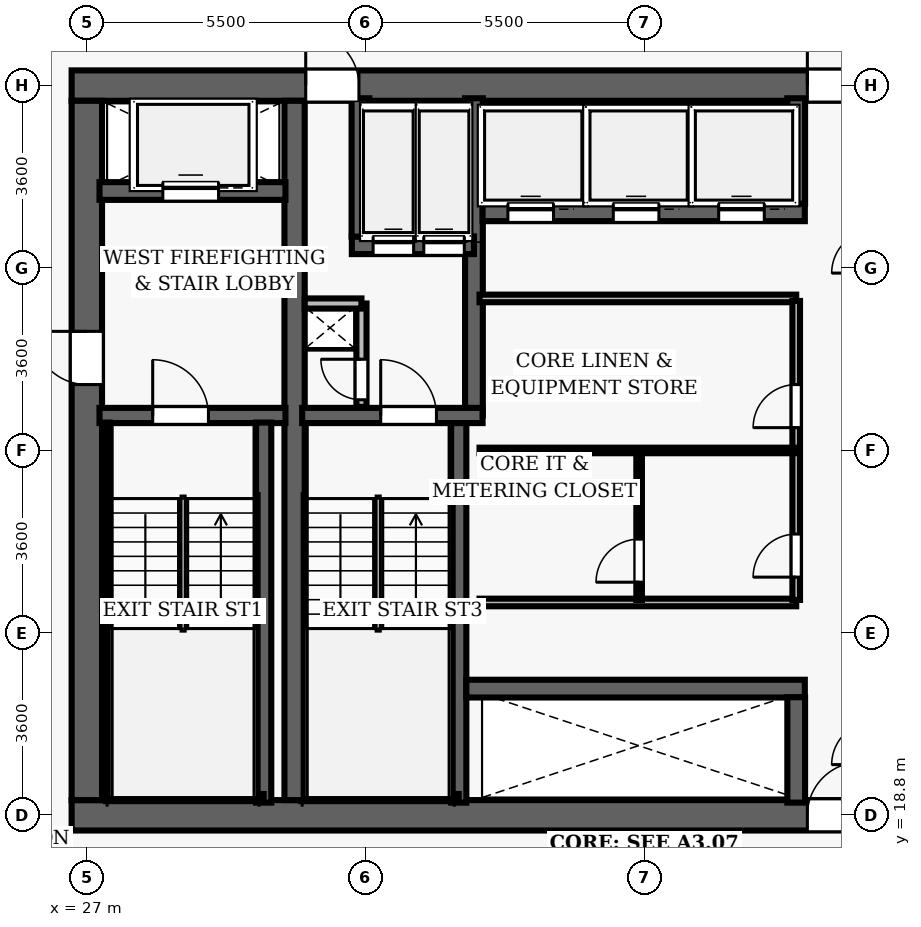
"""IFC4 building model, lengths in metres.
Left out: names, types, materials, properties, quantities, classifications, styles, units other than length and angle.
Written with IfcOpenShell. Run it as: python <this file> out.ifc"""

import sys

from ifc_helpers import new_model, si_unit, direction, frame, frame_2d, origin, place, context, subcontext, project, spatial, rectangle, extrude, element, fill, save


model = new_model("IFC4")
c1 = context("Model", 3, precision=1e-05, world=origin(), true_north=direction((0.0, 1.0)))
c2 = subcontext(c1, "Body", "Model", "MODEL_VIEW")
j1 = project(units=[si_unit("LENGTHUNIT", "METRE"), si_unit("PLANEANGLEUNIT", "RADIAN")], contexts=[c1])
p1 = place(None, origin())
s1 = spatial("IfcSite", under=j1, at=p1, CompositionType="ELEMENT")
p2 = place(p1, origin())
s2 = spatial("IfcBuilding", under=s1, at=p2, CompositionType="ELEMENT")
p3 = place(p2, frame((0.0, 0.0, 41.4)))
s3 = spatial("IfcBuildingStorey", under=s2, at=p3, CompositionType="ELEMENT", Elevation=41.4)
p4 = place(p3, frame((26.7, 18.8, 0.0), z_axis=(0.0, 0.0, 1.0), x_axis=(1.0, 0.0, 0.0)))
e1 = element("IfcWall", 1, at=p4, inside=s3, PredefinedType="SHEAR", context=c2, shape_type="SweptSolid", body=[
    extrude(rectangle(XDim=22.6, YDim=0.6, at=frame_2d((11.3, 0.0))), origin(), (0.0, 0.0, 1.0), 3.5),
])
p5 = place(p4, frame((14.52, 0.0, 0.0)))
e2 = element("IfcOpeningElement", 2, at=p5, cuts=e1, PredefinedType="OPENING", context=c2, shape_type="SweptSolid", body=[
    extrude(rectangle(XDim=1.05, YDim=2.15, at=frame_2d((0.525, 1.075))), frame((0.0, 0.31, 0.0), z_axis=(0.0, -1.0, 0.0), x_axis=(1.0, 0.0, 0.0)), (0.0, 0.0, 1.0), 0.62),
])
p6 = place(p3, frame((26.7, 33.2, 0.0), z_axis=(0.0, 0.0, 1.0), x_axis=(1.0, 0.0, 0.0)))
e3 = element("IfcWall", 3, at=p6, inside=s3, PredefinedType="SHEAR", context=c2, shape_type="SweptSolid", body=[
    extrude(rectangle(XDim=22.6, YDim=0.6, at=frame_2d((11.3, 0.0))), origin(), (0.0, 0.0, 1.0), 3.5),
])
p7 = place(p6, frame((4.62, 0.0, 0.0)))
e4 = element("IfcOpeningElement", 4, at=p7, cuts=e3, PredefinedType="OPENING", context=c2, shape_type="SweptSolid", body=[
    extrude(rectangle(XDim=1.05, YDim=2.15, at=frame_2d((0.525, 1.075))), frame((0.0, 0.31, 0.0), z_axis=(0.0, -1.0, 0.0), x_axis=(1.0, 0.0, 0.0)), (0.0, 0.0, 1.0), 0.62),
])
p8 = place(p6, frame((14.52, 0.0, 0.0)))
e5 = element("IfcOpeningElement", 5, at=p8, cuts=e3, PredefinedType="OPENING", context=c2, shape_type="SweptSolid", body=[
    extrude(rectangle(XDim=1.05, YDim=2.15, at=frame_2d((0.525, 1.075))), frame((0.0, 0.31, 0.0), z_axis=(0.0, -1.0, 0.0), x_axis=(1.0, 0.0, 0.0)), (0.0, 0.0, 1.0), 0.62),
])
p9 = place(p3, frame((27.0, 19.1, 0.0), z_axis=(0.0, 0.0, 1.0), x_axis=(0.0, 1.0, 0.0)))
e6 = element("IfcWall", 6, at=p9, inside=s3, PredefinedType="SHEAR", context=c2, shape_type="SweptSolid", body=[
    extrude(rectangle(XDim=13.8, YDim=0.6, at=frame_2d((6.9, 0.0))), origin(), (0.0, 0.0, 1.0), 3.5),
])
p10 = place(p9, frame((8.2, 0.0, 0.0)))
e7 = element("IfcOpeningElement", 7, at=p10, cuts=e6, PredefinedType="OPENING", context=c2, shape_type="SweptSolid", body=[
    extrude(rectangle(XDim=1.05, YDim=2.15, at=frame_2d((0.525, 1.075))), frame((0.0, 0.31, 0.0), z_axis=(0.0, -1.0, 0.0), x_axis=(1.0, 0.0, 0.0)), (0.0, 0.0, 1.0), 0.62),
])
p11 = place(p3, frame((31.1, 19.1, 0.0), z_axis=(0.0, 0.0, 1.0), x_axis=(0.0, 1.0, 0.0)))
e8 = element("IfcWall", 8, at=p11, inside=s3, PredefinedType="SHEAR", context=c2, shape_type="SweptSolid", body=[
    extrude(rectangle(XDim=13.8, YDim=0.4, at=frame_2d((6.9, 0.0))), origin(), (0.0, 0.0, 1.0), 3.5),
])
p12 = place(p3, frame((27.25, 26.69, 0.0), z_axis=(0.0, 0.0, 1.0), x_axis=(1.0, 0.0, 0.0)))
e9 = element("IfcWall", 9, at=p12, inside=s3, PredefinedType="SHEAR", context=c2, shape_type="SweptSolid", body=[
    extrude(rectangle(XDim=3.67, YDim=0.3, at=frame_2d((1.835, 0.0))), origin(), (0.0, 0.0, 1.0), 3.5),
])
p13 = place(p12, frame((1.05, 0.0, 0.0)))
e10 = element("IfcOpeningElement", 10, at=p13, cuts=e9, PredefinedType="OPENING", context=c2, shape_type="SweptSolid", body=[
    extrude(rectangle(XDim=1.1, YDim=2.15, at=frame_2d((0.55, 1.075))), frame((0.0, 0.16, 0.0), z_axis=(0.0, -1.0, 0.0), x_axis=(1.0, 0.0, 0.0)), (0.0, 0.0, 1.0), 0.32),
])
p14 = place(p3, frame((30.49, 19.05, 0.0), z_axis=(0.0, 0.0, 1.0), x_axis=(0.0, 1.0, 0.0)))
e11 = element("IfcWall", 11, at=p14, inside=s3, PredefinedType="SHEAR", context=c2, shape_type="SweptSolid", body=[
    extrude(rectangle(XDim=7.5, YDim=0.3, at=frame_2d((3.75, 0.0))), origin(), (0.0, 0.0, 1.0), 3.5),
])
p15 = place(p3, frame((27.395, 19.1, 0.0), z_axis=(0.0, 0.0, 1.0), x_axis=(0.0, 1.0, 0.0)))
e12 = element("IfcWall", 12, at=p15, inside=s3, PredefinedType="SHEAR", context=c2, shape_type="SweptSolid", body=[
    extrude(rectangle(XDim=7.45, YDim=0.12, at=frame_2d((3.725, 0.0))), origin(), (0.0, 0.0, 1.0), 3.5),
])
p16 = place(p3, frame((27.395, 19.16, 0.0), z_axis=(0.0, 0.0, 1.0), x_axis=(1.0, 0.0, 0.0)))
e13 = element("IfcWall", 13, at=p16, inside=s3, PredefinedType="SHEAR", context=c2, shape_type="SweptSolid", body=[
    extrude(rectangle(XDim=3.095, YDim=0.12, at=frame_2d((1.547, 0.0))), origin(), (0.0, 0.0, 1.0), 3.5),
])
p17 = place(p3, frame((27.25, 31.12, 0.0), z_axis=(0.0, 0.0, 1.0), x_axis=(1.0, 0.0, 0.0)))
e14 = element("IfcWall", 14, at=p17, inside=s3, PredefinedType="SHEAR", context=c2, shape_type="SweptSolid", body=[
    extrude(rectangle(XDim=3.67, YDim=0.35, at=frame_2d((1.835, 0.0))), origin(), (0.0, 0.0, 1.0), 2.6),
])
p18 = place(p17, frame((1.25, 0.0, 0.0)))
e15 = element("IfcOpeningElement", 15, at=p18, cuts=e14, PredefinedType="OPENING", context=c2, shape_type="SweptSolid", body=[
    extrude(rectangle(XDim=1.1, YDim=2.15, at=frame_2d((0.55, 1.075))), frame((0.0, 0.185, 0.0), z_axis=(0.0, -1.0, 0.0), x_axis=(1.0, 0.0, 0.0)), (0.0, 0.0, 1.0), 0.37),
])
p19 = place(p3, frame((34.34, 19.05, 0.0), z_axis=(0.0, 0.0, 1.0), x_axis=(0.0, 1.0, 0.0)))
e16 = element("IfcWall", 16, at=p19, inside=s3, PredefinedType="SHEAR", context=c2, shape_type="SweptSolid", body=[
    extrude(rectangle(XDim=7.5, YDim=0.3, at=frame_2d((3.75, 0.0))), origin(), (0.0, 0.0, 1.0), 3.5),
])
p20 = place(p3, frame((34.64, 26.69, 0.0), z_axis=(0.0, 0.0, 1.0), x_axis=(0.0, 1.0, 0.0)))
e17 = element("IfcWall", 17, at=p20, inside=s3, PredefinedType="SHEAR", context=c2, shape_type="SweptSolid", body=[
    extrude(rectangle(XDim=6.26, YDim=0.35, at=frame_2d((3.13, 0.0))), origin(), (0.0, 0.0, 1.0), 3.5),
])
p21 = place(p3, frame((31.25, 26.69, 0.0), z_axis=(0.0, 0.0, 1.0), x_axis=(1.0, 0.0, 0.0)))
e18 = element("IfcWall", 18, at=p21, inside=s3, PredefinedType="SHEAR", context=c2, shape_type="SweptSolid", body=[
    extrude(rectangle(XDim=3.56, YDim=0.3, at=frame_2d((1.78, 0.0))), origin(), (0.0, 0.0, 1.0), 3.5),
])
p22 = place(p21, frame((1.55, 0.0, 0.0)))
e19 = element("IfcOpeningElement", 19, at=p22, cuts=e18, PredefinedType="OPENING", context=c2, shape_type="SweptSolid", body=[
    extrude(rectangle(XDim=1.1, YDim=2.15, at=frame_2d((0.55, 1.075))), frame((0.0, 0.16, 0.0), z_axis=(0.0, -1.0, 0.0), x_axis=(1.0, 0.0, 0.0)), (0.0, 0.0, 1.0), 0.32),
])
p23 = place(p3, frame((31.3, 19.16, 0.0), z_axis=(0.0, 0.0, 1.0), x_axis=(1.0, 0.0, 0.0)))
e20 = element("IfcWall", 20, at=p23, inside=s3, PredefinedType="SHEAR", context=c2, shape_type="SweptSolid", body=[
    extrude(rectangle(XDim=3.04, YDim=0.12, at=frame_2d((1.52, 0.0))), origin(), (0.0, 0.0, 1.0), 3.5),
])
p24 = place(p3, frame((32.23, 30.05, 0.0), z_axis=(0.0, 0.0, 1.0), x_axis=(1.0, 0.0, 0.0)))
e21 = element("IfcWall", 21, at=p24, inside=s3, PredefinedType="SHEAR", context=c2, shape_type="SweptSolid", body=[
    extrude(rectangle(XDim=2.41, YDim=0.35, at=frame_2d((1.205, 0.0))), origin(), (0.0, 0.0, 1.0), 2.6),
])
p25 = place(p24, frame((0.42, 0.0, 0.0)))
e22 = element("IfcOpeningElement", 22, at=p25, cuts=e21, PredefinedType="OPENING", context=c2, shape_type="SweptSolid", body=[
    extrude(rectangle(XDim=0.8, YDim=2.15, at=frame_2d((0.4, 1.075))), frame((0.0, 0.185, 0.0), z_axis=(0.0, -1.0, 0.0), x_axis=(1.0, 0.0, 0.0)), (0.0, 0.0, 1.0), 0.37),
])
p26 = place(p24, frame((1.42, 0.0, 0.0)))
e23 = element("IfcOpeningElement", 23, at=p26, cuts=e21, PredefinedType="OPENING", context=c2, shape_type="SweptSolid", body=[
    extrude(rectangle(XDim=0.8, YDim=2.15, at=frame_2d((0.4, 1.075))), frame((0.0, 0.185, 0.0), z_axis=(0.0, -1.0, 0.0), x_axis=(1.0, 0.0, 0.0)), (0.0, 0.0, 1.0), 0.37),
])
p27 = place(p3, frame((32.4, 30.22, 0.0), z_axis=(0.0, 0.0, 1.0), x_axis=(0.0, 1.0, 0.0)))
e24 = element("IfcWall", 24, at=p27, inside=s3, PredefinedType="SHEAR", context=c2, shape_type="SweptSolid", body=[
    extrude(rectangle(XDim=2.73, YDim=0.35, at=frame_2d((1.365, 0.0))), origin(), (0.0, 0.0, 1.0), 2.6),
])
p28 = place(p3, frame((32.42, 26.86, 0.0), z_axis=(0.0, 0.0, 1.0), x_axis=(0.0, 1.0, 0.0)))
e25 = element("IfcWall", 25, at=p28, inside=s3, PredefinedType="PARTITIONING", context=c2, shape_type="SweptSolid", body=[
    extrude(rectangle(XDim=2.04, YDim=0.2, at=frame_2d((1.02, 0.0))), origin(), (0.0, 0.0, 1.0), 2.6),
])
p29 = place(p28, frame((0.14, 0.0, 0.0)))
e26 = element("IfcOpeningElement", 26, at=p29, cuts=e25, PredefinedType="OPENING", context=c2, shape_type="SweptSolid", body=[
    extrude(rectangle(XDim=0.8, YDim=2.05, at=frame_2d((0.4, 1.025))), frame((0.0, 0.11, 0.0), z_axis=(0.0, -1.0, 0.0), x_axis=(1.0, 0.0, 0.0)), (0.0, 0.0, 1.0), 0.22),
])
p30 = place(p3, frame((31.3, 28.9, 0.0), z_axis=(0.0, 0.0, 1.0), x_axis=(1.0, 0.0, 0.0)))
e27 = element("IfcWall", 27, at=p30, inside=s3, PredefinedType="PARTITIONING", context=c2, shape_type="SweptSolid", body=[
    extrude(rectangle(XDim=1.12, YDim=0.2, at=frame_2d((0.56, 0.0))), origin(), (0.0, 0.0, 1.0), 2.6),
])
p31 = place(p3, frame((34.81, 30.7, 0.0), z_axis=(0.0, 0.0, 1.0), x_axis=(1.0, 0.0, 0.0)))
e28 = element("IfcWall", 28, at=p31, inside=s3, PredefinedType="SHEAR", context=c2, shape_type="SweptSolid", body=[
    extrude(rectangle(XDim=6.36, YDim=0.35, at=frame_2d((3.18, 0.0))), origin(), (0.0, 0.0, 1.0), 2.6),
])
p32 = place(p31, frame((0.5, 0.0, 0.0)))
e29 = element("IfcOpeningElement", 29, at=p32, cuts=e28, PredefinedType="OPENING", context=c2, shape_type="SweptSolid", body=[
    extrude(rectangle(XDim=0.9, YDim=2.15, at=frame_2d((0.45, 1.075))), frame((0.0, 0.185, 0.0), z_axis=(0.0, -1.0, 0.0), x_axis=(1.0, 0.0, 0.0)), (0.0, 0.0, 1.0), 0.37),
])
p33 = place(p31, frame((2.58, 0.0, 0.0)))
e30 = element("IfcOpeningElement", 30, at=p33, cuts=e28, PredefinedType="OPENING", context=c2, shape_type="SweptSolid", body=[
    extrude(rectangle(XDim=0.9, YDim=2.15, at=frame_2d((0.45, 1.075))), frame((0.0, 0.185, 0.0), z_axis=(0.0, -1.0, 0.0), x_axis=(1.0, 0.0, 0.0)), (0.0, 0.0, 1.0), 0.37),
])
p34 = place(p31, frame((4.66, 0.0, 0.0)))
e31 = element("IfcOpeningElement", 31, at=p34, cuts=e28, PredefinedType="OPENING", context=c2, shape_type="SweptSolid", body=[
    extrude(rectangle(XDim=0.9, YDim=2.15, at=frame_2d((0.45, 1.075))), frame((0.0, 0.185, 0.0), z_axis=(0.0, -1.0, 0.0), x_axis=(1.0, 0.0, 0.0)), (0.0, 0.0, 1.0), 0.37),
])
p35 = place(p3, frame((41.0, 30.87, 0.0), z_axis=(0.0, 0.0, 1.0), x_axis=(0.0, 1.0, 0.0)))
e32 = element("IfcWall", 32, at=p35, inside=s3, PredefinedType="SHEAR", context=c2, shape_type="SweptSolid", body=[
    extrude(rectangle(XDim=2.08, YDim=0.35, at=frame_2d((1.04, 0.0))), origin(), (0.0, 0.0, 1.0), 2.6),
])
p36 = place(p3, frame((34.49, 21.3, 0.0), z_axis=(0.0, 0.0, 1.0), x_axis=(1.0, 0.0, 0.0)))
e33 = element("IfcWall", 33, at=p36, inside=s3, PredefinedType="SHEAR", context=c2, shape_type="SweptSolid", body=[
    extrude(rectangle(XDim=6.68, YDim=0.35, at=frame_2d((3.34, 0.0))), origin(), (0.0, 0.0, 1.0), 2.6),
])
p37 = place(p3, frame((41.0, 19.05, 0.0), z_axis=(0.0, 0.0, 1.0), x_axis=(0.0, 1.0, 0.0)))
e34 = element("IfcWall", 34, at=p37, inside=s3, PredefinedType="SHEAR", context=c2, shape_type="SweptSolid", body=[
    extrude(rectangle(XDim=2.08, YDim=0.35, at=frame_2d((1.04, 0.0))), origin(), (0.0, 0.0, 1.0), 2.6),
])
for number, where, z_axis, x_axis in (
    (35, (34.75, 29.0, 0.0), (0.0, 0.0, 1.0), (1.0, 0.0, 0.0)),
    (36, (34.75, 23.0, 0.0), (0.0, 0.0, 1.0), (1.0, 0.0, 0.0)),
):
    element("IfcWall", number, at=place(p3, frame(where, z_axis=z_axis, x_axis=x_axis)), inside=s3, PredefinedType="PARTITIONING", context=c2, shape_type="SweptSolid", body=[
        extrude(rectangle(XDim=6.25, YDim=0.15, at=frame_2d((3.125, 0.0))), origin(), (0.0, 0.0, 1.0), 2.6),
    ])
p38 = place(p3, frame((41.0, 23.05, 0.0), z_axis=(0.0, 0.0, 1.0), x_axis=(0.0, 1.0, 0.0)))
e37 = element("IfcWall", 37, at=p38, inside=s3, PredefinedType="PARTITIONING", context=c2, shape_type="SweptSolid", body=[
    extrude(rectangle(XDim=5.9, YDim=0.15, at=frame_2d((2.95, 0.0))), origin(), (0.0, 0.0, 1.0), 2.6),
])
p39 = place(p38, frame((3.4, 0.0, 0.0)))
e38 = element("IfcOpeningElement", 38, at=p39, cuts=e37, PredefinedType="OPENING", context=c2, shape_type="SweptSolid", body=[
    extrude(rectangle(XDim=0.85, YDim=2.1, at=frame_2d((0.425, 1.05))), frame((0.0, 0.085, 0.0), z_axis=(0.0, -1.0, 0.0), x_axis=(1.0, 0.0, 0.0)), (0.0, 0.0, 1.0), 0.17),
])
p40 = place(p38, frame((0.45, 0.0, 0.0)))
e39 = element("IfcOpeningElement", 39, at=p40, cuts=e37, PredefinedType="OPENING", context=c2, shape_type="SweptSolid", body=[
    extrude(rectangle(XDim=0.85, YDim=2.1, at=frame_2d((0.425, 1.05))), frame((0.0, 0.085, 0.0), z_axis=(0.0, -1.0, 0.0), x_axis=(1.0, 0.0, 0.0)), (0.0, 0.0, 1.0), 0.17),
])
p41 = place(p3, frame((34.75, 26.0, 0.0), z_axis=(0.0, 0.0, 1.0), x_axis=(1.0, 0.0, 0.0)))
e40 = element("IfcWall", 40, at=p41, inside=s3, PredefinedType="PARTITIONING", context=c2, shape_type="SweptSolid", body=[
    extrude(rectangle(XDim=6.25, YDim=0.11, at=frame_2d((3.125, 0.0))), origin(), (0.0, 0.0, 1.0), 2.6),
])
p42 = place(p3, frame((37.9, 23.05, 0.0), z_axis=(0.0, 0.0, 1.0), x_axis=(0.0, 1.0, 0.0)))
e41 = element("IfcWall", 41, at=p42, inside=s3, PredefinedType="PARTITIONING", context=c2, shape_type="SweptSolid", body=[
    extrude(rectangle(XDim=2.95, YDim=0.11, at=frame_2d((1.475, 0.0))), origin(), (0.0, 0.0, 1.0), 2.6),
])
p43 = place(p42, frame((0.35, 0.0, 0.0)))
e42 = element("IfcOpeningElement", 42, at=p43, cuts=e41, PredefinedType="OPENING", context=c2, shape_type="SweptSolid", body=[
    extrude(rectangle(XDim=0.85, YDim=2.1, at=frame_2d((0.425, 1.05))), frame((0.0, 0.065, 0.0), z_axis=(0.0, -1.0, 0.0), x_axis=(1.0, 0.0, 0.0)), (0.0, 0.0, 1.0), 0.13),
])
p44 = place(p13, origin())
e43 = element("IfcDoor", 43, at=p44, inside=s3, OperationType="SINGLE_SWING_LEFT", PredefinedType="DOOR", context=c2, shape_type="SweptSolid", body=[
    extrude(rectangle(XDim=1.1, YDim=2.15, at=frame_2d((0.55, 1.075))), frame((0.0, 0.025, 0.0), z_axis=(0.0, -1.0, 0.0), x_axis=(1.0, 0.0, 0.0)), (0.0, 0.0, 1.0), 0.05),
])
fill(e10, e43)
p45 = place(p10, origin())
e44 = element("IfcDoor", 44, at=p45, inside=s3, OperationType="SINGLE_SWING_RIGHT", PredefinedType="DOOR", context=c2, shape_type="SweptSolid", body=[
    extrude(rectangle(XDim=1.05, YDim=2.15, at=frame_2d((0.525, 1.075))), frame((0.0, 0.025, 0.0), z_axis=(0.0, -1.0, 0.0), x_axis=(1.0, 0.0, 0.0)), (0.0, 0.0, 1.0), 0.05),
])
fill(e7, e44)
p46 = place(p22, origin())
e45 = element("IfcDoor", 45, at=p46, inside=s3, OperationType="SINGLE_SWING_LEFT", PredefinedType="DOOR", context=c2, shape_type="SweptSolid", body=[
    extrude(rectangle(XDim=1.1, YDim=2.15, at=frame_2d((0.55, 1.075))), frame((0.0, 0.025, 0.0), z_axis=(0.0, -1.0, 0.0), x_axis=(1.0, 0.0, 0.0)), (0.0, 0.0, 1.0), 0.05),
])
fill(e19, e45)
p47 = place(p29, origin())
e46 = element("IfcDoor", 46, at=p47, inside=s3, OperationType="SINGLE_SWING_RIGHT", PredefinedType="DOOR", context=c2, shape_type="SweptSolid", body=[
    extrude(rectangle(XDim=0.8, YDim=2.05, at=frame_2d((0.4, 1.025))), frame((0.0, 0.025, 0.0), z_axis=(0.0, -1.0, 0.0), x_axis=(1.0, 0.0, 0.0)), (0.0, 0.0, 1.0), 0.05),
])
fill(e26, e46)
p48 = place(p7, origin())
e47 = element("IfcDoor", 47, at=p48, inside=s3, OperationType="SINGLE_SWING_LEFT", PredefinedType="DOOR", context=c2, shape_type="SweptSolid", body=[
    extrude(rectangle(XDim=1.05, YDim=2.15, at=frame_2d((0.525, 1.075))), frame((0.0, 0.025, 0.0), z_axis=(0.0, -1.0, 0.0), x_axis=(1.0, 0.0, 0.0)), (0.0, 0.0, 1.0), 0.05),
])
fill(e4, e47)
p49 = place(p8, origin())
e48 = element("IfcDoor", 48, at=p49, inside=s3, OperationType="SINGLE_SWING_LEFT", PredefinedType="DOOR", context=c2, shape_type="SweptSolid", body=[
    extrude(rectangle(XDim=1.05, YDim=2.15, at=frame_2d((0.525, 1.075))), frame((0.0, 0.025, 0.0), z_axis=(0.0, -1.0, 0.0), x_axis=(1.0, 0.0, 0.0)), (0.0, 0.0, 1.0), 0.05),
])
fill(e5, e48)
p50 = place(p5, origin())
e49 = element("IfcDoor", 49, at=p50, inside=s3, OperationType="SINGLE_SWING_RIGHT", PredefinedType="DOOR", context=c2, shape_type="SweptSolid", body=[
    extrude(rectangle(XDim=1.05, YDim=2.15, at=frame_2d((0.525, 1.075))), frame((0.0, 0.025, 0.0), z_axis=(0.0, -1.0, 0.0), x_axis=(1.0, 0.0, 0.0)), (0.0, 0.0, 1.0), 0.05),
])
fill(e2, e49)
p51 = place(p39, origin())
e50 = element("IfcDoor", 50, at=p51, inside=s3, OperationType="SINGLE_SWING_LEFT", PredefinedType="DOOR", context=c2, shape_type="SweptSolid", body=[
    extrude(rectangle(XDim=0.85, YDim=2.1, at=frame_2d((0.425, 1.05))), frame((0.0, 0.025, 0.0), z_axis=(0.0, -1.0, 0.0), x_axis=(1.0, 0.0, 0.0)), (0.0, 0.0, 1.0), 0.05),
])
fill(e38, e50)
p52 = place(p40, origin())
e51 = element("IfcDoor", 51, at=p52, inside=s3, OperationType="SINGLE_SWING_LEFT", PredefinedType="DOOR", context=c2, shape_type="SweptSolid", body=[
    extrude(rectangle(XDim=0.85, YDim=2.1, at=frame_2d((0.425, 1.05))), frame((0.0, 0.025, 0.0), z_axis=(0.0, -1.0, 0.0), x_axis=(1.0, 0.0, 0.0)), (0.0, 0.0, 1.0), 0.05),
])
fill(e39, e51)
p53 = place(p43, origin())
e52 = element("IfcDoor", 52, at=p53, inside=s3, OperationType="SINGLE_SWING_LEFT", PredefinedType="DOOR", context=c2, shape_type="SweptSolid", body=[
    extrude(rectangle(XDim=0.85, YDim=2.1, at=frame_2d((0.425, 1.05))), frame((0.0, 0.025, 0.0), z_axis=(0.0, -1.0, 0.0), x_axis=(1.0, 0.0, 0.0)), (0.0, 0.0, 1.0), 0.05),
])
fill(e42, e52)
p54 = place(p32, origin())
e53 = element("IfcDoor", 53, at=p54, inside=s3, OperationType="SLIDING_TO_LEFT", PredefinedType="DOOR", context=c2, shape_type="SweptSolid", body=[
    extrude(rectangle(XDim=0.9, YDim=2.15, at=frame_2d((0.45, 1.075))), frame((0.0, 0.025, 0.0), z_axis=(0.0, -1.0, 0.0), x_axis=(1.0, 0.0, 0.0)), (0.0, 0.0, 1.0), 0.05),
])
fill(e29, e53)
p55 = place(p33, origin())
e54 = element("IfcDoor", 54, at=p55, inside=s3, OperationType="SLIDING_TO_LEFT", PredefinedType="DOOR", context=c2, shape_type="SweptSolid", body=[
    extrude(rectangle(XDim=0.9, YDim=2.15, at=frame_2d((0.45, 1.075))), frame((0.0, 0.025, 0.0), z_axis=(0.0, -1.0, 0.0), x_axis=(1.0, 0.0, 0.0)), (0.0, 0.0, 1.0), 0.05),
])
fill(e30, e54)
p56 = place(p34, origin())
e55 = element("IfcDoor", 55, at=p56, inside=s3, OperationType="SLIDING_TO_LEFT", PredefinedType="DOOR", context=c2, shape_type="SweptSolid", body=[
    extrude(rectangle(XDim=0.9, YDim=2.15, at=frame_2d((0.45, 1.075))), frame((0.0, 0.025, 0.0), z_axis=(0.0, -1.0, 0.0), x_axis=(1.0, 0.0, 0.0)), (0.0, 0.0, 1.0), 0.05),
])
fill(e31, e55)
p57 = place(p18, origin())
e56 = element("IfcDoor", 56, at=p57, inside=s3, OperationType="SLIDING_TO_LEFT", PredefinedType="DOOR", context=c2, shape_type="SweptSolid", body=[
    extrude(rectangle(XDim=1.1, YDim=2.15, at=frame_2d((0.55, 1.075))), frame((0.0, 0.025, 0.0), z_axis=(0.0, -1.0, 0.0), x_axis=(1.0, 0.0, 0.0)), (0.0, 0.0, 1.0), 0.05),
])
fill(e15, e56)
p58 = place(p25, origin())
e57 = element("IfcDoor", 57, at=p58, inside=s3, OperationType="SLIDING_TO_LEFT", PredefinedType="DOOR", context=c2, shape_type="SweptSolid", body=[
    extrude(rectangle(XDim=0.8, YDim=2.15, at=frame_2d((0.4, 1.075))), frame((0.0, 0.025, 0.0), z_axis=(0.0, -1.0, 0.0), x_axis=(1.0, 0.0, 0.0)), (0.0, 0.0, 1.0), 0.05),
])
fill(e22, e57)
p59 = place(p26, origin())
e58 = element("IfcDoor", 58, at=p59, inside=s3, OperationType="SLIDING_TO_LEFT", PredefinedType="DOOR", context=c2, shape_type="SweptSolid", body=[
    extrude(rectangle(XDim=0.8, YDim=2.15, at=frame_2d((0.4, 1.075))), frame((0.0, 0.025, 0.0), z_axis=(0.0, -1.0, 0.0), x_axis=(1.0, 0.0, 0.0)), (0.0, 0.0, 1.0), 0.05),
])
fill(e23, e58)
save(model, sys.argv[1])
